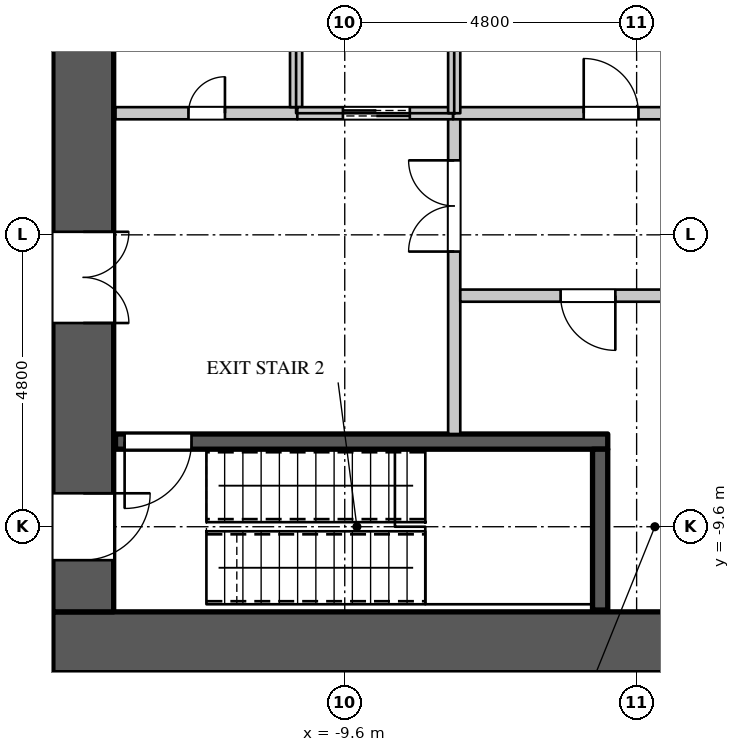
"""IFC4 building model, lengths in metres.
Left out: names, types, materials, properties, quantities, classifications, styles, units other than length and angle.
Written with IfcOpenShell. Run it as: python <this file> out.ifc"""

import sys

from ifc_helpers import new_model, si_unit, direction, frame, frame_2d, origin, place, context, subcontext, project, spatial, rectangle, extrude, element, fill, save


model = new_model("IFC4")
c1 = context("Model", 3, precision=1e-05, world=origin(), true_north=direction((0.0, 1.0)))
c2 = subcontext(c1, "Body", "Model", "MODEL_VIEW")
j1 = project(units=[si_unit("LENGTHUNIT", "METRE"), si_unit("PLANEANGLEUNIT", "RADIAN")], contexts=[c1])
p1 = place(None, origin())
s1 = spatial("IfcSite", under=j1, at=p1, CompositionType="ELEMENT")
p2 = place(p1, origin())
s2 = spatial("IfcBuilding", under=s1, at=p2, CompositionType="ELEMENT")
p3 = place(p2, frame((0.0, 0.0, 96.9)))
s3 = spatial("IfcBuildingStorey", under=s2, at=p3, CompositionType="ELEMENT", Elevation=96.9)
p4 = place(p3, frame((-14.4, -11.5, 0.0), z_axis=(0.0, 0.0, 1.0), x_axis=(1.0, 0.0, 0.0)))
e1 = element("IfcWall", 1, at=p4, inside=s3, PredefinedType="SHEAR", context=c2, shape_type="SweptSolid", body=[
    extrude(rectangle(XDim=28.8, YDim=1.0, at=frame_2d((14.4, 0.0))), origin(), (0.0, 0.0, 1.0), 4.2),
])
p5 = place(p3, frame((-13.9, -11.0, 0.0), z_axis=(0.0, 0.0, 1.0), x_axis=(0.0, 1.0, 0.0)))
e2 = element("IfcWall", 2, at=p5, inside=s3, PredefinedType="SHEAR", context=c2, shape_type="SweptSolid", body=[
    extrude(rectangle(XDim=22.0, YDim=1.0, at=frame_2d((11.0, 0.0))), origin(), (0.0, 0.0, 1.0), 4.2),
])
p6 = place(p5, frame((20.05, 0.0, 0.0)))
e3 = element("IfcOpeningElement", 3, at=p6, cuts=e2, PredefinedType="OPENING", context=c2, shape_type="SweptSolid", body=[
    extrude(rectangle(XDim=1.1, YDim=2.2, at=frame_2d((0.55, 1.1))), frame((0.0, 0.51, 0.0), z_axis=(0.0, -1.0, 0.0), x_axis=(1.0, 0.0, 0.0)), (0.0, 0.0, 1.0), 1.02),
])
p7 = place(p5, frame((0.85, 0.0, 0.0)))
e4 = element("IfcOpeningElement", 4, at=p7, cuts=e2, PredefinedType="OPENING", context=c2, shape_type="SweptSolid", body=[
    extrude(rectangle(XDim=1.1, YDim=2.2, at=frame_2d((0.55, 1.1))), frame((0.0, 0.51, 0.0), z_axis=(0.0, -1.0, 0.0), x_axis=(1.0, 0.0, 0.0)), (0.0, 0.0, 1.0), 1.02),
])
p8 = place(p5, frame((15.75, 0.0, 0.0)))
e5 = element("IfcOpeningElement", 5, at=p8, cuts=e2, PredefinedType="OPENING", context=c2, shape_type="SweptSolid", body=[
    extrude(rectangle(XDim=1.5, YDim=2.4, at=frame_2d((0.75, 1.2))), frame((0.0, 0.51, 0.0), z_axis=(0.0, -1.0, 0.0), x_axis=(1.0, 0.0, 0.0)), (0.0, 0.0, 1.0), 1.02),
])
p9 = place(p5, frame((4.75, 0.0, 0.0)))
e6 = element("IfcOpeningElement", 6, at=p9, cuts=e2, PredefinedType="OPENING", context=c2, shape_type="SweptSolid", body=[
    extrude(rectangle(XDim=1.5, YDim=2.4, at=frame_2d((0.75, 1.2))), frame((0.0, 0.51, 0.0), z_axis=(0.0, -1.0, 0.0), x_axis=(1.0, 0.0, 0.0)), (0.0, 0.0, 1.0), 1.02),
])
p10 = place(p3, frame((-7.8, -8.075, 0.0), z_axis=(0.0, 0.0, 1.0), x_axis=(0.0, 1.0, 0.0)))
e7 = element("IfcWall", 7, at=p10, inside=s3, PredefinedType="PARTITIONING", context=c2, shape_type="SweptSolid", body=[
    extrude(rectangle(XDim=5.275, YDim=0.2, at=frame_2d((2.637, 0.0))), origin(), (0.0, 0.0, 1.0), 3.798),
])
p11 = place(p10, frame((3.0, 0.0, 0.0)))
e8 = element("IfcOpeningElement", 8, at=p11, cuts=e7, PredefinedType="OPENING", context=c2, shape_type="SweptSolid", body=[
    extrude(rectangle(XDim=1.5, YDim=2.4, at=frame_2d((0.75, 1.2))), frame((0.0, 0.11, 0.0), z_axis=(0.0, -1.0, 0.0), x_axis=(1.0, 0.0, 0.0)), (0.0, 0.0, 1.0), 0.22),
])
p12 = place(p3, frame((-7.7, -5.8, 0.0), z_axis=(0.0, 0.0, 1.0), x_axis=(1.0, 0.0, 0.0)))
e9 = element("IfcWall", 9, at=p12, inside=s3, PredefinedType="PARTITIONING", context=c2, shape_type="SweptSolid", body=[
    extrude(rectangle(XDim=21.07, YDim=0.2, at=frame_2d((10.535, 0.0))), origin(), (0.0, 0.0, 1.0), 3.798),
])
p13 = place(p12, frame((1.65, 0.0, 0.0)))
e10 = element("IfcOpeningElement", 10, at=p13, cuts=e9, PredefinedType="OPENING", context=c2, shape_type="SweptSolid", body=[
    extrude(rectangle(XDim=0.9, YDim=2.2, at=frame_2d((0.45, 1.1))), frame((0.0, 0.11, 0.0), z_axis=(0.0, -1.0, 0.0), x_axis=(1.0, 0.0, 0.0)), (0.0, 0.0, 1.0), 0.22),
])
p14 = place(p12, frame((5.7, 0.0, 0.0)))
e11 = element("IfcOpeningElement", 11, at=p14, cuts=e9, PredefinedType="OPENING", context=c2, shape_type="SweptSolid", body=[
    extrude(rectangle(XDim=0.9, YDim=2.2, at=frame_2d((0.45, 1.1))), frame((0.0, 0.11, 0.0), z_axis=(0.0, -1.0, 0.0), x_axis=(1.0, 0.0, 0.0)), (0.0, 0.0, 1.0), 0.22),
])
p15 = place(p12, frame((10.2, 0.0, 0.0)))
e12 = element("IfcOpeningElement", 12, at=p15, cuts=e9, PredefinedType="OPENING", context=c2, shape_type="SweptSolid", body=[
    extrude(rectangle(XDim=0.9, YDim=2.2, at=frame_2d((0.45, 1.1))), frame((0.0, 0.11, 0.0), z_axis=(0.0, -1.0, 0.0), x_axis=(1.0, 0.0, 0.0)), (0.0, 0.0, 1.0), 0.22),
])
p16 = place(p12, frame((14.55, 0.0, 0.0)))
e13 = element("IfcOpeningElement", 13, at=p16, cuts=e9, PredefinedType="OPENING", context=c2, shape_type="SweptSolid", body=[
    extrude(rectangle(XDim=0.9, YDim=2.2, at=frame_2d((0.45, 1.1))), frame((0.0, 0.11, 0.0), z_axis=(0.0, -1.0, 0.0), x_axis=(1.0, 0.0, 0.0)), (0.0, 0.0, 1.0), 0.22),
])
p17 = place(p12, frame((18.5, 0.0, 0.0)))
e14 = element("IfcOpeningElement", 14, at=p17, cuts=e9, PredefinedType="OPENING", context=c2, shape_type="SweptSolid", body=[
    extrude(rectangle(XDim=0.9, YDim=2.2, at=frame_2d((0.45, 1.1))), frame((0.0, 0.11, 0.0), z_axis=(0.0, -1.0, 0.0), x_axis=(1.0, 0.0, 0.0)), (0.0, 0.0, 1.0), 0.22),
])
p18 = place(p3, frame((-13.37, -2.8, 0.0), z_axis=(0.0, 0.0, 1.0), x_axis=(1.0, 0.0, 0.0)))
e15 = element("IfcWall", 15, at=p18, inside=s3, PredefinedType="PARTITIONING", context=c2, shape_type="SweptSolid", body=[
    extrude(rectangle(XDim=2.99, YDim=0.2, at=frame_2d((1.495, 0.0))), origin(), (0.0, 0.0, 1.0), 3.798),
])
p19 = place(p18, frame((1.2, 0.0, 0.0)))
e16 = element("IfcOpeningElement", 16, at=p19, cuts=e15, PredefinedType="OPENING", context=c2, shape_type="SweptSolid", body=[
    extrude(rectangle(XDim=0.6, YDim=2.0, at=frame_2d((0.3, 1.0))), frame((0.0, 0.11, 0.0), z_axis=(0.0, -1.0, 0.0), x_axis=(1.0, 0.0, 0.0)), (0.0, 0.0, 1.0), 0.22),
])
p20 = place(p3, frame((-7.82, -2.8, 0.0), z_axis=(0.0, 0.0, 1.0), x_axis=(1.0, 0.0, 0.0)))
e17 = element("IfcWall", 17, at=p20, inside=s3, PredefinedType="PARTITIONING", context=c2, shape_type="SweptSolid", body=[
    extrude(rectangle(XDim=5.2, YDim=0.2, at=frame_2d((2.6, 0.0))), origin(), (0.0, 0.0, 1.0), 3.798),
])
p21 = place(p20, frame((2.15, 0.0, 0.0)))
e18 = element("IfcOpeningElement", 18, at=p21, cuts=e17, PredefinedType="OPENING", context=c2, shape_type="SweptSolid", body=[
    extrude(rectangle(XDim=0.9, YDim=2.2, at=frame_2d((0.45, 1.1))), frame((0.0, 0.11, 0.0), z_axis=(0.0, -1.0, 0.0), x_axis=(1.0, 0.0, 0.0)), (0.0, 0.0, 1.0), 0.22),
])
p22 = place(p3, frame((-10.4, -2.7, 0.0), z_axis=(0.0, 0.0, 1.0), x_axis=(0.0, 1.0, 0.0)))
e19 = element("IfcWall", 19, at=p22, inside=s3, PredefinedType="PARTITIONING", context=c2, shape_type="SweptSolid", body=[
    extrude(rectangle(XDim=2.7, YDim=0.2, at=frame_2d((1.35, 0.0))), origin(), (0.0, 0.0, 1.0), 3.798),
])
p23 = place(p3, frame((-10.38, -2.8, 0.0), z_axis=(0.0, 0.0, 1.0), x_axis=(1.0, 0.0, 0.0)))
e20 = element("IfcWall", 20, at=p23, inside=s3, PredefinedType="PARTITIONING", context=c2, shape_type="SweptSolid", body=[
    extrude(rectangle(XDim=2.56, YDim=0.2, at=frame_2d((1.28, 0.0))), origin(), (0.0, 0.0, 1.0), 3.798),
])
p24 = place(p23, frame((0.75, 0.0, 0.0)))
e21 = element("IfcOpeningElement", 21, at=p24, cuts=e20, PredefinedType="OPENING", context=c2, shape_type="SweptSolid", body=[
    extrude(rectangle(XDim=1.1, YDim=2.2, at=frame_2d((0.55, 1.1))), frame((0.0, 0.11, 0.0), z_axis=(0.0, -1.0, 0.0), x_axis=(1.0, 0.0, 0.0)), (0.0, 0.0, 1.0), 0.22),
])
p25 = place(p3, frame((-7.8, -2.8, 0.0), z_axis=(0.0, 0.0, 1.0), x_axis=(0.0, 1.0, 0.0)))
e22 = element("IfcWall", 22, at=p25, inside=s3, PredefinedType="PARTITIONING", context=c2, shape_type="SweptSolid", body=[
    extrude(rectangle(XDim=2.8, YDim=0.2, at=frame_2d((1.4, 0.0))), origin(), (0.0, 0.0, 1.0), 3.798),
])
p26 = place(p3, frame((-13.37, -8.2, 0.0), z_axis=(0.0, 0.0, 1.0), x_axis=(1.0, 0.0, 0.0)))
e23 = element("IfcWall", 23, at=p26, inside=s3, PredefinedType="SHEAR", context=c2, shape_type="SweptSolid", body=[
    extrude(rectangle(XDim=8.095, YDim=0.25, at=frame_2d((4.048, 0.0))), origin(), (0.0, 0.0, 1.0), 3.798),
])
p27 = place(p26, frame((0.15, 0.0, 0.0)))
e24 = element("IfcOpeningElement", 24, at=p27, cuts=e23, PredefinedType="OPENING", context=c2, shape_type="SweptSolid", body=[
    extrude(rectangle(XDim=1.1, YDim=2.2, at=frame_2d((0.55, 1.1))), frame((0.0, 0.135, 0.0), z_axis=(0.0, -1.0, 0.0), x_axis=(1.0, 0.0, 0.0)), (0.0, 0.0, 1.0), 0.27),
])
p28 = place(p3, frame((-5.4, -10.97, 0.0), z_axis=(0.0, 0.0, 1.0), x_axis=(0.0, 1.0, 0.0)))
e25 = element("IfcWall", 25, at=p28, inside=s3, PredefinedType="SHEAR", context=c2, shape_type="SweptSolid", body=[
    extrude(rectangle(XDim=2.645, YDim=0.25, at=frame_2d((1.323, 0.0))), origin(), (0.0, 0.0, 1.0), 3.798),
])
p29 = place(p19, origin())
e26 = element("IfcDoor", 26, at=p29, inside=s3, OperationType="SINGLE_SWING_RIGHT", PredefinedType="DOOR", context=c2, shape_type="SweptSolid", body=[
    extrude(rectangle(XDim=0.6, YDim=2.0, at=frame_2d((0.3, 1.0))), frame((0.0, 0.025, 0.0), z_axis=(0.0, -1.0, 0.0), x_axis=(1.0, 0.0, 0.0)), (0.0, 0.0, 1.0), 0.05),
])
fill(e16, e26)
p30 = place(p13, origin())
e27 = element("IfcDoor", 27, at=p30, inside=s3, OperationType="SINGLE_SWING_LEFT", PredefinedType="DOOR", context=c2, shape_type="SweptSolid", body=[
    extrude(rectangle(XDim=0.9, YDim=2.2, at=frame_2d((0.45, 1.1))), frame((0.0, 0.025, 0.0), z_axis=(0.0, -1.0, 0.0), x_axis=(1.0, 0.0, 0.0)), (0.0, 0.0, 1.0), 0.05),
])
fill(e10, e27)
p31 = place(p21, origin())
e28 = element("IfcDoor", 28, at=p31, inside=s3, OperationType="SINGLE_SWING_LEFT", PredefinedType="DOOR", context=c2, shape_type="SweptSolid", body=[
    extrude(rectangle(XDim=0.9, YDim=2.2, at=frame_2d((0.45, 1.1))), frame((0.0, 0.025, 0.0), z_axis=(0.0, -1.0, 0.0), x_axis=(1.0, 0.0, 0.0)), (0.0, 0.0, 1.0), 0.05),
])
fill(e18, e28)
p32 = place(p24, origin())
e29 = element("IfcDoor", 29, at=p32, inside=s3, OperationType="DOUBLE_DOOR_SLIDING", PredefinedType="DOOR", context=c2, shape_type="SweptSolid", body=[
    extrude(rectangle(XDim=1.1, YDim=2.2, at=frame_2d((0.55, 1.1))), frame((0.0, 0.025, 0.0), z_axis=(0.0, -1.0, 0.0), x_axis=(1.0, 0.0, 0.0)), (0.0, 0.0, 1.0), 0.05),
])
fill(e21, e29)
p33 = place(p27, origin())
e30 = element("IfcDoor", 30, at=p33, inside=s3, OperationType="SINGLE_SWING_RIGHT", PredefinedType="DOOR", context=c2, shape_type="SweptSolid", body=[
    extrude(rectangle(XDim=1.1, YDim=2.2, at=frame_2d((0.55, 1.1))), frame((0.0, 0.025, 0.0), z_axis=(0.0, -1.0, 0.0), x_axis=(1.0, 0.0, 0.0)), (0.0, 0.0, 1.0), 0.05),
])
fill(e24, e30)
p34 = place(p11, origin())
e31 = element("IfcDoor", 31, at=p34, inside=s3, OperationType="DOUBLE_DOOR_SINGLE_SWING", PredefinedType="DOOR", context=c2, shape_type="SweptSolid", body=[
    extrude(rectangle(XDim=1.5, YDim=2.4, at=frame_2d((0.75, 1.2))), frame((0.0, 0.025, 0.0), z_axis=(0.0, -1.0, 0.0), x_axis=(1.0, 0.0, 0.0)), (0.0, 0.0, 1.0), 0.05),
])
fill(e8, e31)
p35 = place(p7, origin())
e32 = element("IfcDoor", 32, at=p35, inside=s3, OperationType="SINGLE_SWING_LEFT", PredefinedType="DOOR", context=c2, shape_type="SweptSolid", body=[
    extrude(rectangle(XDim=1.1, YDim=2.2, at=frame_2d((0.55, 1.1))), frame((0.0, -0.445, 0.0), z_axis=(0.0, -1.0, 0.0), x_axis=(1.0, 0.0, 0.0)), (0.0, 0.0, 1.0), 0.05),
])
fill(e4, e32)
p36 = place(p9, origin())
e33 = element("IfcDoor", 33, at=p36, inside=s3, OperationType="DOUBLE_DOOR_SINGLE_SWING", PredefinedType="DOOR", context=c2, shape_type="SweptSolid", body=[
    extrude(rectangle(XDim=1.5, YDim=2.4, at=frame_2d((0.75, 1.2))), frame((0.0, -0.445, 0.0), z_axis=(0.0, -1.0, 0.0), x_axis=(1.0, 0.0, 0.0)), (0.0, 0.0, 1.0), 0.05),
])
fill(e6, e33)
save(model, sys.argv[1])
